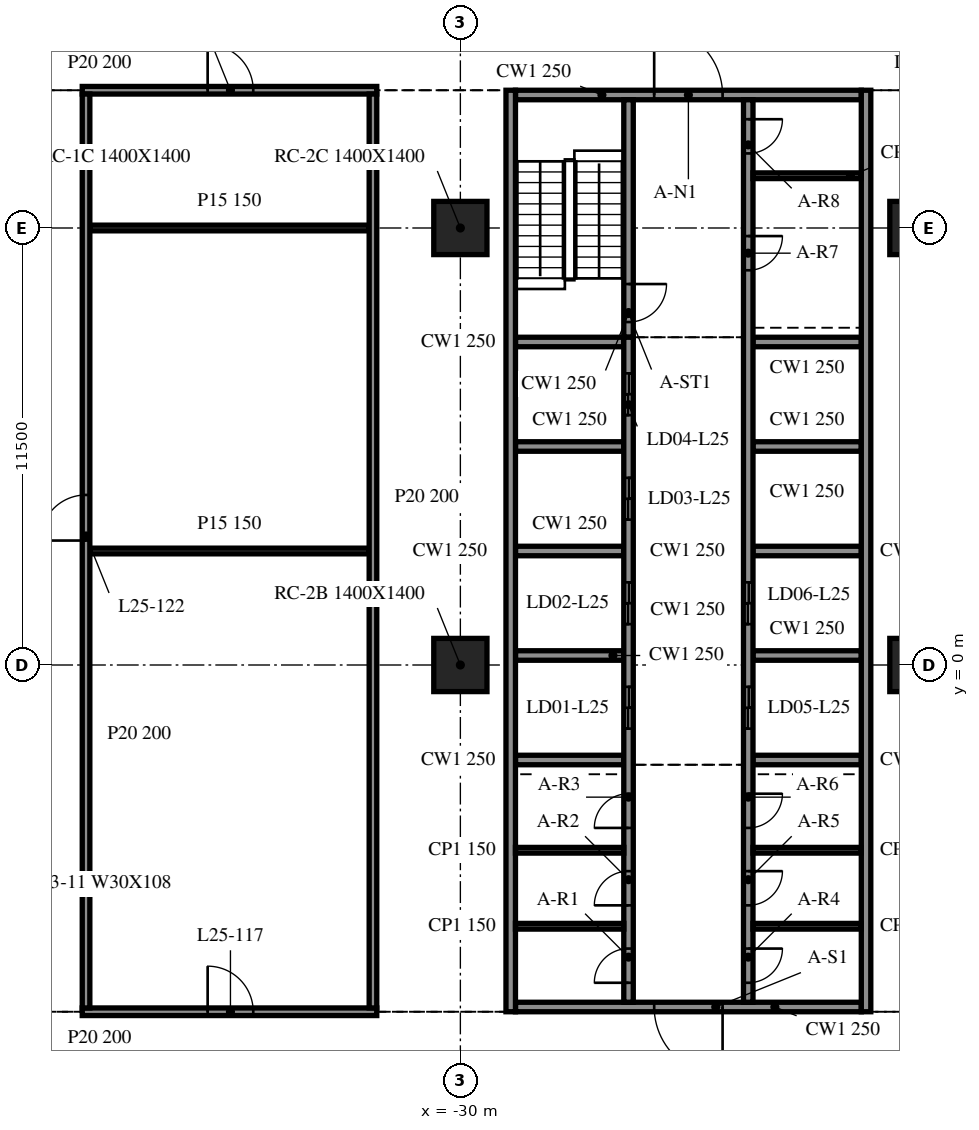
"""IFC4 building model, lengths in metres.
Left out: names, types, materials, properties, quantities, classifications, styles, units other than length and angle.
Written with IfcOpenShell. Run it as: python <this file> out.ifc"""

import sys

from ifc_helpers import new_model, si_unit, direction, frame, frame_2d, origin, origin_2d, place, context, subcontext, project, spatial, rectangle, extrude, element, fill, save


model = new_model("IFC4")
c1 = context("Model", 3, precision=1e-05, world=origin(), true_north=direction((0.0, 1.0)))
c2 = subcontext(c1, "Body", "Model", "MODEL_VIEW")
j1 = project(units=[si_unit("LENGTHUNIT", "METRE"), si_unit("PLANEANGLEUNIT", "RADIAN")], contexts=[c1])
p1 = place(None, origin())
s1 = spatial("IfcSite", under=j1, at=p1, CompositionType="ELEMENT")
p2 = place(p1, origin())
s2 = spatial("IfcBuilding", under=s1, at=p2, CompositionType="ELEMENT")
p3 = place(p2, frame((0.0, 0.0, 109.4)))
s3 = spatial("IfcBuildingStorey", under=s2, at=p3, CompositionType="ELEMENT", Elevation=109.4)
for number, where, z_axis, x_axis in (
    (1, (-30.0, 0.0, -0.34), (0.0, 0.0, 1.0), (1.0, 0.0, 0.0)),
    (2, (-30.0, 11.5, -0.34), (0.0, 0.0, 1.0), (1.0, 0.0, 0.0)),
    (3, (-18.0, 0.0, -0.34), (0.0, 0.0, 1.0), (1.0, 0.0, 0.0)),
    (4, (-18.0, 11.5, -0.34), (0.0, 0.0, 1.0), (1.0, 0.0, 0.0)),
):
    element("IfcColumn", number, at=place(p3, frame(where, z_axis=z_axis, x_axis=x_axis)), inside=s3, PredefinedType="COLUMN", context=c2, shape_type="SweptSolid", body=[
        extrude(rectangle(XDim=1.4, YDim=1.4, at=origin_2d()), origin(), (0.0, 0.0, 1.0), 4.1),
    ])
for number, where, z_axis, x_axis in (
    (5, (-28.675, 15.125, 0.0), (0.0, 0.0, 1.0), (0.0, -1.0, 0.0)),
    (6, (-19.325, -9.125, 0.0), (0.0, 0.0, 1.0), (0.0, 1.0, 0.0)),
):
    element("IfcWall", number, at=place(p3, frame(where, z_axis=z_axis, x_axis=x_axis)), inside=s3, PredefinedType="SOLIDWALL", context=c2, shape_type="SweptSolid", body=[
        extrude(rectangle(XDim=24.25, YDim=0.25, at=frame_2d((12.125, 0.0))), origin(), (0.0, 0.0, 1.0), 3.76),
    ])
p4 = place(p3, frame((-19.45, -9.0, 0.0), z_axis=(0.0, 0.0, 1.0), x_axis=(-1.0, 0.0, 0.0)))
e7 = element("IfcWall", 7, at=p4, inside=s3, PredefinedType="SOLIDWALL", context=c2, shape_type="SweptSolid", body=[
    extrude(rectangle(XDim=9.1, YDim=0.25, at=frame_2d((4.55, 0.0))), origin(), (0.0, 0.0, 1.0), 3.76),
])
p5 = place(p4, frame((3.65, 0.0, 0.0)))
e8 = element("IfcOpeningElement", 8, at=p5, cuts=e7, PredefinedType="OPENING", context=c2, shape_type="SweptSolid", body=[
    extrude(rectangle(XDim=1.8, YDim=2.1, at=frame_2d((0.9, 1.05))), frame((0.0, 0.135, 0.0), z_axis=(0.0, -1.0, 0.0), x_axis=(1.0, 0.0, 0.0)), (0.0, 0.0, 1.0), 0.27),
])
p6 = place(p3, frame((-28.55, 15.0, 0.0), z_axis=(0.0, 0.0, 1.0), x_axis=(1.0, 0.0, 0.0)))
e9 = element("IfcWall", 9, at=p6, inside=s3, PredefinedType="SOLIDWALL", context=c2, shape_type="SweptSolid", body=[
    extrude(rectangle(XDim=9.1, YDim=0.25, at=frame_2d((4.55, 0.0))), origin(), (0.0, 0.0, 1.0), 3.76),
])
p7 = place(p6, frame((3.65, 0.0, 0.0)))
e10 = element("IfcOpeningElement", 10, at=p7, cuts=e9, PredefinedType="OPENING", context=c2, shape_type="SweptSolid", body=[
    extrude(rectangle(XDim=1.8, YDim=2.1, at=frame_2d((0.9, 1.05))), frame((0.0, 0.135, 0.0), z_axis=(0.0, -1.0, 0.0), x_axis=(1.0, 0.0, 0.0)), (0.0, 0.0, 1.0), 0.27),
])
p8 = place(p3, frame((-25.575, -8.875, 0.0), z_axis=(0.0, 0.0, 1.0), x_axis=(0.0, 1.0, 0.0)))
e11 = element("IfcWall", 11, at=p8, inside=s3, PredefinedType="SOLIDWALL", context=c2, shape_type="SweptSolid", body=[
    extrude(rectangle(XDim=17.5, YDim=0.25, at=frame_2d((8.75, 0.0))), origin(), (0.0, 0.0, 1.0), 3.76),
])
p9 = place(p8, frame((7.2, 0.0, 0.0)))
e12 = element("IfcOpeningElement", 12, at=p9, cuts=e11, PredefinedType="OPENING", context=c2, shape_type="SweptSolid", body=[
    extrude(rectangle(XDim=1.1, YDim=2.1, at=frame_2d((0.55, 1.05))), frame((0.0, 0.135, 0.0), z_axis=(0.0, -1.0, 0.0), x_axis=(1.0, 0.0, 0.0)), (0.0, 0.0, 1.0), 0.27),
])
p10 = place(p8, frame((9.95, 0.0, 0.0)))
e13 = element("IfcOpeningElement", 13, at=p10, cuts=e11, PredefinedType="OPENING", context=c2, shape_type="SweptSolid", body=[
    extrude(rectangle(XDim=1.1, YDim=2.1, at=frame_2d((0.55, 1.05))), frame((0.0, 0.135, 0.0), z_axis=(0.0, -1.0, 0.0), x_axis=(1.0, 0.0, 0.0)), (0.0, 0.0, 1.0), 0.27),
])
p11 = place(p8, frame((12.7, 0.0, 0.0)))
e14 = element("IfcOpeningElement", 14, at=p11, cuts=e11, PredefinedType="OPENING", context=c2, shape_type="SweptSolid", body=[
    extrude(rectangle(XDim=1.1, YDim=2.1, at=frame_2d((0.55, 1.05))), frame((0.0, 0.135, 0.0), z_axis=(0.0, -1.0, 0.0), x_axis=(1.0, 0.0, 0.0)), (0.0, 0.0, 1.0), 0.27),
])
p12 = place(p8, frame((15.45, 0.0, 0.0)))
e15 = element("IfcOpeningElement", 15, at=p12, cuts=e11, PredefinedType="OPENING", context=c2, shape_type="SweptSolid", body=[
    extrude(rectangle(XDim=1.1, YDim=2.1, at=frame_2d((0.55, 1.05))), frame((0.0, 0.135, 0.0), z_axis=(0.0, -1.0, 0.0), x_axis=(1.0, 0.0, 0.0)), (0.0, 0.0, 1.0), 0.27),
])
p13 = place(p8, frame((0.512, 0.0, 0.0)))
e16 = element("IfcOpeningElement", 16, at=p13, cuts=e11, PredefinedType="OPENING", context=c2, shape_type="SweptSolid", body=[
    extrude(rectangle(XDim=0.9, YDim=2.1, at=frame_2d((0.45, 1.05))), frame((0.0, 0.135, 0.0), z_axis=(0.0, -1.0, 0.0), x_axis=(1.0, 0.0, 0.0)), (0.0, 0.0, 1.0), 0.27),
])
p14 = place(p8, frame((2.55, 0.0, 0.0)))
e17 = element("IfcOpeningElement", 17, at=p14, cuts=e11, PredefinedType="OPENING", context=c2, shape_type="SweptSolid", body=[
    extrude(rectangle(XDim=0.9, YDim=2.1, at=frame_2d((0.45, 1.05))), frame((0.0, 0.135, 0.0), z_axis=(0.0, -1.0, 0.0), x_axis=(1.0, 0.0, 0.0)), (0.0, 0.0, 1.0), 0.27),
])
p15 = place(p8, frame((4.587, 0.0, 0.0)))
e18 = element("IfcOpeningElement", 18, at=p15, cuts=e11, PredefinedType="OPENING", context=c2, shape_type="SweptSolid", body=[
    extrude(rectangle(XDim=0.9, YDim=2.1, at=frame_2d((0.45, 1.05))), frame((0.0, 0.135, 0.0), z_axis=(0.0, -1.0, 0.0), x_axis=(1.0, 0.0, 0.0)), (0.0, 0.0, 1.0), 0.27),
])
p16 = place(p3, frame((-25.575, 14.875, 0.0), z_axis=(0.0, 0.0, 1.0), x_axis=(0.0, -1.0, 0.0)))
e19 = element("IfcWall", 19, at=p16, inside=s3, PredefinedType="SOLIDWALL", context=c2, shape_type="SweptSolid", body=[
    extrude(rectangle(XDim=6.25, YDim=0.25, at=frame_2d((3.125, 0.0))), origin(), (0.0, 0.0, 1.0), 3.76),
])
p17 = place(p16, frame((4.85, 0.0, 0.0)))
e20 = element("IfcOpeningElement", 20, at=p17, cuts=e19, PredefinedType="OPENING", context=c2, shape_type="SweptSolid", body=[
    extrude(rectangle(XDim=1.0, YDim=2.1, at=frame_2d((0.5, 1.05))), frame((0.0, 0.135, 0.0), z_axis=(0.0, -1.0, 0.0), x_axis=(1.0, 0.0, 0.0)), (0.0, 0.0, 1.0), 0.27),
])
p18 = place(p3, frame((-22.425, 14.875, 0.0), z_axis=(0.0, 0.0, 1.0), x_axis=(0.0, -1.0, 0.0)))
e21 = element("IfcWall", 21, at=p18, inside=s3, PredefinedType="SOLIDWALL", context=c2, shape_type="SweptSolid", body=[
    extrude(rectangle(XDim=23.75, YDim=0.25, at=frame_2d((11.875, 0.0))), origin(), (0.0, 0.0, 1.0), 3.76),
])
p19 = place(p18, frame((15.45, 0.0, 0.0)))
e22 = element("IfcOpeningElement", 22, at=p19, cuts=e21, PredefinedType="OPENING", context=c2, shape_type="SweptSolid", body=[
    extrude(rectangle(XDim=1.1, YDim=2.1, at=frame_2d((0.55, 1.05))), frame((0.0, 0.135, 0.0), z_axis=(0.0, -1.0, 0.0), x_axis=(1.0, 0.0, 0.0)), (0.0, 0.0, 1.0), 0.27),
])
p20 = place(p18, frame((12.7, 0.0, 0.0)))
e23 = element("IfcOpeningElement", 23, at=p20, cuts=e21, PredefinedType="OPENING", context=c2, shape_type="SweptSolid", body=[
    extrude(rectangle(XDim=1.1, YDim=2.1, at=frame_2d((0.55, 1.05))), frame((0.0, 0.135, 0.0), z_axis=(0.0, -1.0, 0.0), x_axis=(1.0, 0.0, 0.0)), (0.0, 0.0, 1.0), 0.27),
])
p21 = place(p18, frame((22.337, 0.0, 0.0)))
e24 = element("IfcOpeningElement", 24, at=p21, cuts=e21, PredefinedType="OPENING", context=c2, shape_type="SweptSolid", body=[
    extrude(rectangle(XDim=0.9, YDim=2.1, at=frame_2d((0.45, 1.05))), frame((0.0, 0.135, 0.0), z_axis=(0.0, -1.0, 0.0), x_axis=(1.0, 0.0, 0.0)), (0.0, 0.0, 1.0), 0.27),
])
p22 = place(p18, frame((20.3, 0.0, 0.0)))
e25 = element("IfcOpeningElement", 25, at=p22, cuts=e21, PredefinedType="OPENING", context=c2, shape_type="SweptSolid", body=[
    extrude(rectangle(XDim=0.9, YDim=2.1, at=frame_2d((0.45, 1.05))), frame((0.0, 0.135, 0.0), z_axis=(0.0, -1.0, 0.0), x_axis=(1.0, 0.0, 0.0)), (0.0, 0.0, 1.0), 0.27),
])
p23 = place(p18, frame((18.262, 0.0, 0.0)))
e26 = element("IfcOpeningElement", 26, at=p23, cuts=e21, PredefinedType="OPENING", context=c2, shape_type="SweptSolid", body=[
    extrude(rectangle(XDim=0.9, YDim=2.1, at=frame_2d((0.45, 1.05))), frame((0.0, 0.135, 0.0), z_axis=(0.0, -1.0, 0.0), x_axis=(1.0, 0.0, 0.0)), (0.0, 0.0, 1.0), 0.27),
])
p24 = place(p18, frame((3.587, 0.0, 0.0)))
e27 = element("IfcOpeningElement", 27, at=p24, cuts=e21, PredefinedType="OPENING", context=c2, shape_type="SweptSolid", body=[
    extrude(rectangle(XDim=0.9, YDim=2.1, at=frame_2d((0.45, 1.05))), frame((0.0, 0.135, 0.0), z_axis=(0.0, -1.0, 0.0), x_axis=(1.0, 0.0, 0.0)), (0.0, 0.0, 1.0), 0.27),
])
p25 = place(p18, frame((0.512, 0.0, 0.0)))
e28 = element("IfcOpeningElement", 28, at=p25, cuts=e21, PredefinedType="OPENING", context=c2, shape_type="SweptSolid", body=[
    extrude(rectangle(XDim=0.9, YDim=2.1, at=frame_2d((0.45, 1.05))), frame((0.0, 0.135, 0.0), z_axis=(0.0, -1.0, 0.0), x_axis=(1.0, 0.0, 0.0)), (0.0, 0.0, 1.0), 0.27),
])
for number, where, z_axis, x_axis in (
    (29, (-28.55, -2.5, 0.0), (0.0, 0.0, 1.0), (1.0, 0.0, 0.0)),
    (30, (-28.55, 0.25, 0.0), (0.0, 0.0, 1.0), (1.0, 0.0, 0.0)),
    (31, (-28.55, 3.0, 0.0), (0.0, 0.0, 1.0), (1.0, 0.0, 0.0)),
    (32, (-28.55, 5.75, 0.0), (0.0, 0.0, 1.0), (1.0, 0.0, 0.0)),
    (33, (-28.55, 8.5, 0.0), (0.0, 0.0, 1.0), (1.0, 0.0, 0.0)),
    (34, (-22.3, -2.5, 0.0), (0.0, 0.0, 1.0), (1.0, 0.0, 0.0)),
    (35, (-22.3, 0.25, 0.0), (0.0, 0.0, 1.0), (1.0, 0.0, 0.0)),
    (36, (-22.3, 3.0, 0.0), (0.0, 0.0, 1.0), (1.0, 0.0, 0.0)),
    (37, (-22.3, 5.75, 0.0), (0.0, 0.0, 1.0), (1.0, 0.0, 0.0)),
    (38, (-22.3, 8.5, 0.0), (0.0, 0.0, 1.0), (1.0, 0.0, 0.0)),
):
    element("IfcWall", number, at=place(p3, frame(where, z_axis=z_axis, x_axis=x_axis)), inside=s3, PredefinedType="SOLIDWALL", context=c2, shape_type="SweptSolid", body=[
        extrude(rectangle(XDim=2.85, YDim=0.25, at=frame_2d((1.425, 0.0))), origin(), (0.0, 0.0, 1.0), 3.76),
    ])
for number, where, z_axis, x_axis in (
    (39, (-28.55, -6.875, 0.0), (0.0, 0.0, 1.0), (1.0, 0.0, 0.0)),
    (40, (-28.55, -4.875, 0.0), (0.0, 0.0, 1.0), (1.0, 0.0, 0.0)),
    (41, (-22.3, -6.875, 0.0), (0.0, 0.0, 1.0), (1.0, 0.0, 0.0)),
    (42, (-22.3, -4.875, 0.0), (0.0, 0.0, 1.0), (1.0, 0.0, 0.0)),
    (43, (-22.3, 12.875, 0.0), (0.0, 0.0, 1.0), (1.0, 0.0, 0.0)),
):
    element("IfcWall", number, at=place(p3, frame(where, z_axis=z_axis, x_axis=x_axis)), inside=s3, PredefinedType="PARTITIONING", context=c2, shape_type="SweptSolid", body=[
        extrude(rectangle(XDim=2.85, YDim=0.15, at=frame_2d((1.425, 0.0))), origin(), (0.0, 0.0, 1.0), 3.76),
    ])
p26 = place(p3, frame((-39.95, -9.125, 0.0), z_axis=(0.0, 0.0, 1.0), x_axis=(1.0, 0.0, 0.0)))
e44 = element("IfcWall", 44, at=p26, inside=s3, PredefinedType="PARTITIONING", context=c2, shape_type="SweptSolid", body=[
    extrude(rectangle(XDim=7.75, YDim=0.2, at=frame_2d((3.875, 0.0))), origin(), (0.0, 0.0, 1.0), 3.76),
])
p27 = place(p26, frame((3.3, 0.0, 0.0)))
e45 = element("IfcOpeningElement", 45, at=p27, cuts=e44, PredefinedType="OPENING", context=c2, shape_type="SweptSolid", body=[
    extrude(rectangle(XDim=1.2, YDim=2.1, at=frame_2d((0.6, 1.05))), frame((0.0, 0.11, 0.0), z_axis=(0.0, -1.0, 0.0), x_axis=(1.0, 0.0, 0.0)), (0.0, 0.0, 1.0), 0.22),
])
for number, where, z_axis, x_axis in (
    (46, (-39.75, 3.0, 0.0), (0.0, 0.0, 1.0), (1.0, 0.0, 0.0)),
    (47, (-39.75, 11.5, 0.0), (0.0, 0.0, 1.0), (1.0, 0.0, 0.0)),
):
    element("IfcWall", number, at=place(p3, frame(where, z_axis=z_axis, x_axis=x_axis)), inside=s3, PredefinedType="PARTITIONING", context=c2, shape_type="SweptSolid", body=[
        extrude(rectangle(XDim=7.35, YDim=0.15, at=frame_2d((3.675, 0.0))), origin(), (0.0, 0.0, 1.0), 3.76),
    ])
p28 = place(p3, frame((-39.95, 15.125, 0.0), z_axis=(0.0, 0.0, 1.0), x_axis=(1.0, 0.0, 0.0)))
e48 = element("IfcWall", 48, at=p28, inside=s3, PredefinedType="PARTITIONING", context=c2, shape_type="SweptSolid", body=[
    extrude(rectangle(XDim=7.75, YDim=0.2, at=frame_2d((3.875, 0.0))), origin(), (0.0, 0.0, 1.0), 3.76),
])
p29 = place(p28, frame((3.3, 0.0, 0.0)))
e49 = element("IfcOpeningElement", 49, at=p29, cuts=e48, PredefinedType="OPENING", context=c2, shape_type="SweptSolid", body=[
    extrude(rectangle(XDim=1.2, YDim=2.1, at=frame_2d((0.6, 1.05))), frame((0.0, 0.11, 0.0), z_axis=(0.0, -1.0, 0.0), x_axis=(1.0, 0.0, 0.0)), (0.0, 0.0, 1.0), 0.22),
])
p30 = place(p3, frame((-39.85, -9.025, 0.0), z_axis=(0.0, 0.0, 1.0), x_axis=(0.0, 1.0, 0.0)))
e50 = element("IfcWall", 50, at=p30, inside=s3, PredefinedType="PARTITIONING", context=c2, shape_type="SweptSolid", body=[
    extrude(rectangle(XDim=24.05, YDim=0.2, at=frame_2d((12.025, 0.0))), origin(), (0.0, 0.0, 1.0), 3.76),
])
p31 = place(p30, frame((12.3, 0.0, 0.0)))
e51 = element("IfcOpeningElement", 51, at=p31, cuts=e50, PredefinedType="OPENING", context=c2, shape_type="SweptSolid", body=[
    extrude(rectangle(XDim=1.2, YDim=2.1, at=frame_2d((0.6, 1.05))), frame((0.0, 0.11, 0.0), z_axis=(0.0, -1.0, 0.0), x_axis=(1.0, 0.0, 0.0)), (0.0, 0.0, 1.0), 0.22),
])
p32 = place(p3, frame((-32.3, -9.025, 0.0), z_axis=(0.0, 0.0, 1.0), x_axis=(0.0, 1.0, 0.0)))
e52 = element("IfcWall", 52, at=p32, inside=s3, PredefinedType="PARTITIONING", context=c2, shape_type="SweptSolid", body=[
    extrude(rectangle(XDim=24.05, YDim=0.2, at=frame_2d((12.025, 0.0))), origin(), (0.0, 0.0, 1.0), 3.76),
])
p33 = place(p5, origin())
e53 = element("IfcDoor", 53, at=p33, inside=s3, OperationType="DOUBLE_DOOR_SINGLE_SWING", PredefinedType="DOOR", context=c2, shape_type="SweptSolid", body=[
    extrude(rectangle(XDim=1.8, YDim=2.1, at=frame_2d((0.9, 1.05))), frame((0.0, 0.025, 0.0), z_axis=(0.0, -1.0, 0.0), x_axis=(1.0, 0.0, 0.0)), (0.0, 0.0, 1.0), 0.05),
])
fill(e8, e53)
p34 = place(p7, origin())
e54 = element("IfcDoor", 54, at=p34, inside=s3, OperationType="DOUBLE_DOOR_SINGLE_SWING", PredefinedType="DOOR", context=c2, shape_type="SweptSolid", body=[
    extrude(rectangle(XDim=1.8, YDim=2.1, at=frame_2d((0.9, 1.05))), frame((0.0, 0.025, 0.0), z_axis=(0.0, -1.0, 0.0), x_axis=(1.0, 0.0, 0.0)), (0.0, 0.0, 1.0), 0.05),
])
fill(e10, e54)
p35 = place(p19, origin())
e55 = element("IfcDoor", 55, at=p35, inside=s3, OperationType="DOUBLE_DOOR_SLIDING", PredefinedType="DOOR", context=c2, shape_type="SweptSolid", body=[
    extrude(rectangle(XDim=1.1, YDim=2.1, at=frame_2d((0.55, 1.05))), frame((0.0, 0.025, 0.0), z_axis=(0.0, -1.0, 0.0), x_axis=(1.0, 0.0, 0.0)), (0.0, 0.0, 1.0), 0.05),
])
fill(e22, e55)
p36 = place(p20, origin())
e56 = element("IfcDoor", 56, at=p36, inside=s3, OperationType="DOUBLE_DOOR_SLIDING", PredefinedType="DOOR", context=c2, shape_type="SweptSolid", body=[
    extrude(rectangle(XDim=1.1, YDim=2.1, at=frame_2d((0.55, 1.05))), frame((0.0, 0.025, 0.0), z_axis=(0.0, -1.0, 0.0), x_axis=(1.0, 0.0, 0.0)), (0.0, 0.0, 1.0), 0.05),
])
fill(e23, e56)
p37 = place(p9, origin())
e57 = element("IfcDoor", 57, at=p37, inside=s3, OperationType="DOUBLE_DOOR_SLIDING", PredefinedType="DOOR", context=c2, shape_type="SweptSolid", body=[
    extrude(rectangle(XDim=1.1, YDim=2.1, at=frame_2d((0.55, 1.05))), frame((0.0, 0.025, 0.0), z_axis=(0.0, -1.0, 0.0), x_axis=(1.0, 0.0, 0.0)), (0.0, 0.0, 1.0), 0.05),
])
fill(e12, e57)
p38 = place(p10, origin())
e58 = element("IfcDoor", 58, at=p38, inside=s3, OperationType="DOUBLE_DOOR_SLIDING", PredefinedType="DOOR", context=c2, shape_type="SweptSolid", body=[
    extrude(rectangle(XDim=1.1, YDim=2.1, at=frame_2d((0.55, 1.05))), frame((0.0, 0.025, 0.0), z_axis=(0.0, -1.0, 0.0), x_axis=(1.0, 0.0, 0.0)), (0.0, 0.0, 1.0), 0.05),
])
fill(e13, e58)
p39 = place(p11, origin())
e59 = element("IfcDoor", 59, at=p39, inside=s3, OperationType="DOUBLE_DOOR_SLIDING", PredefinedType="DOOR", context=c2, shape_type="SweptSolid", body=[
    extrude(rectangle(XDim=1.1, YDim=2.1, at=frame_2d((0.55, 1.05))), frame((0.0, 0.025, 0.0), z_axis=(0.0, -1.0, 0.0), x_axis=(1.0, 0.0, 0.0)), (0.0, 0.0, 1.0), 0.05),
])
fill(e14, e59)
p40 = place(p12, origin())
e60 = element("IfcDoor", 60, at=p40, inside=s3, OperationType="DOUBLE_DOOR_SLIDING", PredefinedType="DOOR", context=c2, shape_type="SweptSolid", body=[
    extrude(rectangle(XDim=1.1, YDim=2.1, at=frame_2d((0.55, 1.05))), frame((0.0, 0.025, 0.0), z_axis=(0.0, -1.0, 0.0), x_axis=(1.0, 0.0, 0.0)), (0.0, 0.0, 1.0), 0.05),
])
fill(e15, e60)
p41 = place(p13, origin())
e61 = element("IfcDoor", 61, at=p41, inside=s3, OperationType="SINGLE_SWING_LEFT", PredefinedType="DOOR", context=c2, shape_type="SweptSolid", body=[
    extrude(rectangle(XDim=0.9, YDim=2.1, at=frame_2d((0.45, 1.05))), frame((0.0, 0.025, 0.0), z_axis=(0.0, -1.0, 0.0), x_axis=(1.0, 0.0, 0.0)), (0.0, 0.0, 1.0), 0.05),
])
fill(e16, e61)
p42 = place(p14, origin())
e62 = element("IfcDoor", 62, at=p42, inside=s3, OperationType="SINGLE_SWING_RIGHT", PredefinedType="DOOR", context=c2, shape_type="SweptSolid", body=[
    extrude(rectangle(XDim=0.9, YDim=2.1, at=frame_2d((0.45, 1.05))), frame((0.0, 0.025, 0.0), z_axis=(0.0, -1.0, 0.0), x_axis=(1.0, 0.0, 0.0)), (0.0, 0.0, 1.0), 0.05),
])
fill(e17, e62)
p43 = place(p15, origin())
e63 = element("IfcDoor", 63, at=p43, inside=s3, OperationType="SINGLE_SWING_LEFT", PredefinedType="DOOR", context=c2, shape_type="SweptSolid", body=[
    extrude(rectangle(XDim=0.9, YDim=2.1, at=frame_2d((0.45, 1.05))), frame((0.0, 0.025, 0.0), z_axis=(0.0, -1.0, 0.0), x_axis=(1.0, 0.0, 0.0)), (0.0, 0.0, 1.0), 0.05),
])
fill(e18, e63)
p44 = place(p21, origin())
e64 = element("IfcDoor", 64, at=p44, inside=s3, OperationType="SINGLE_SWING_RIGHT", PredefinedType="DOOR", context=c2, shape_type="SweptSolid", body=[
    extrude(rectangle(XDim=0.9, YDim=2.1, at=frame_2d((0.45, 1.05))), frame((0.0, 0.025, 0.0), z_axis=(0.0, -1.0, 0.0), x_axis=(1.0, 0.0, 0.0)), (0.0, 0.0, 1.0), 0.05),
])
fill(e24, e64)
p45 = place(p22, origin())
e65 = element("IfcDoor", 65, at=p45, inside=s3, OperationType="SINGLE_SWING_LEFT", PredefinedType="DOOR", context=c2, shape_type="SweptSolid", body=[
    extrude(rectangle(XDim=0.9, YDim=2.1, at=frame_2d((0.45, 1.05))), frame((0.0, 0.025, 0.0), z_axis=(0.0, -1.0, 0.0), x_axis=(1.0, 0.0, 0.0)), (0.0, 0.0, 1.0), 0.05),
])
fill(e25, e65)
p46 = place(p23, origin())
e66 = element("IfcDoor", 66, at=p46, inside=s3, OperationType="SINGLE_SWING_RIGHT", PredefinedType="DOOR", context=c2, shape_type="SweptSolid", body=[
    extrude(rectangle(XDim=0.9, YDim=2.1, at=frame_2d((0.45, 1.05))), frame((0.0, 0.025, 0.0), z_axis=(0.0, -1.0, 0.0), x_axis=(1.0, 0.0, 0.0)), (0.0, 0.0, 1.0), 0.05),
])
fill(e26, e66)
p47 = place(p24, origin())
e67 = element("IfcDoor", 67, at=p47, inside=s3, OperationType="SINGLE_SWING_LEFT", PredefinedType="DOOR", context=c2, shape_type="SweptSolid", body=[
    extrude(rectangle(XDim=0.9, YDim=2.1, at=frame_2d((0.45, 1.05))), frame((0.0, 0.025, 0.0), z_axis=(0.0, -1.0, 0.0), x_axis=(1.0, 0.0, 0.0)), (0.0, 0.0, 1.0), 0.05),
])
fill(e27, e67)
p48 = place(p25, origin())
e68 = element("IfcDoor", 68, at=p48, inside=s3, OperationType="SINGLE_SWING_RIGHT", PredefinedType="DOOR", context=c2, shape_type="SweptSolid", body=[
    extrude(rectangle(XDim=0.9, YDim=2.1, at=frame_2d((0.45, 1.05))), frame((0.0, 0.025, 0.0), z_axis=(0.0, -1.0, 0.0), x_axis=(1.0, 0.0, 0.0)), (0.0, 0.0, 1.0), 0.05),
])
fill(e28, e68)
p49 = place(p17, origin())
e69 = element("IfcDoor", 69, at=p49, inside=s3, OperationType="SINGLE_SWING_LEFT", PredefinedType="DOOR", context=c2, shape_type="SweptSolid", body=[
    extrude(rectangle(XDim=1.0, YDim=2.1, at=frame_2d((0.5, 1.05))), frame((0.0, 0.025, 0.0), z_axis=(0.0, -1.0, 0.0), x_axis=(1.0, 0.0, 0.0)), (0.0, 0.0, 1.0), 0.05),
])
fill(e20, e69)
p50 = place(p27, origin())
e70 = element("IfcDoor", 70, at=p50, inside=s3, OperationType="SINGLE_SWING_RIGHT", PredefinedType="DOOR", context=c2, shape_type="SweptSolid", body=[
    extrude(rectangle(XDim=1.2, YDim=2.1, at=frame_2d((0.6, 1.05))), frame((0.0, 0.025, 0.0), z_axis=(0.0, -1.0, 0.0), x_axis=(1.0, 0.0, 0.0)), (0.0, 0.0, 1.0), 0.05),
])
fill(e45, e70)
p51 = place(p31, origin())
e71 = element("IfcDoor", 71, at=p51, inside=s3, OperationType="SINGLE_SWING_LEFT", PredefinedType="DOOR", context=c2, shape_type="SweptSolid", body=[
    extrude(rectangle(XDim=1.2, YDim=2.1, at=frame_2d((0.6, 1.05))), frame((0.0, 0.025, 0.0), z_axis=(0.0, -1.0, 0.0), x_axis=(1.0, 0.0, 0.0)), (0.0, 0.0, 1.0), 0.05),
])
fill(e51, e71)
p52 = place(p29, origin())
e72 = element("IfcDoor", 72, at=p52, inside=s3, OperationType="SINGLE_SWING_LEFT", PredefinedType="DOOR", context=c2, shape_type="SweptSolid", body=[
    extrude(rectangle(XDim=1.2, YDim=2.1, at=frame_2d((0.6, 1.05))), frame((0.0, 0.025, 0.0), z_axis=(0.0, -1.0, 0.0), x_axis=(1.0, 0.0, 0.0)), (0.0, 0.0, 1.0), 0.05),
])
fill(e49, e72)
save(model, sys.argv[1])
